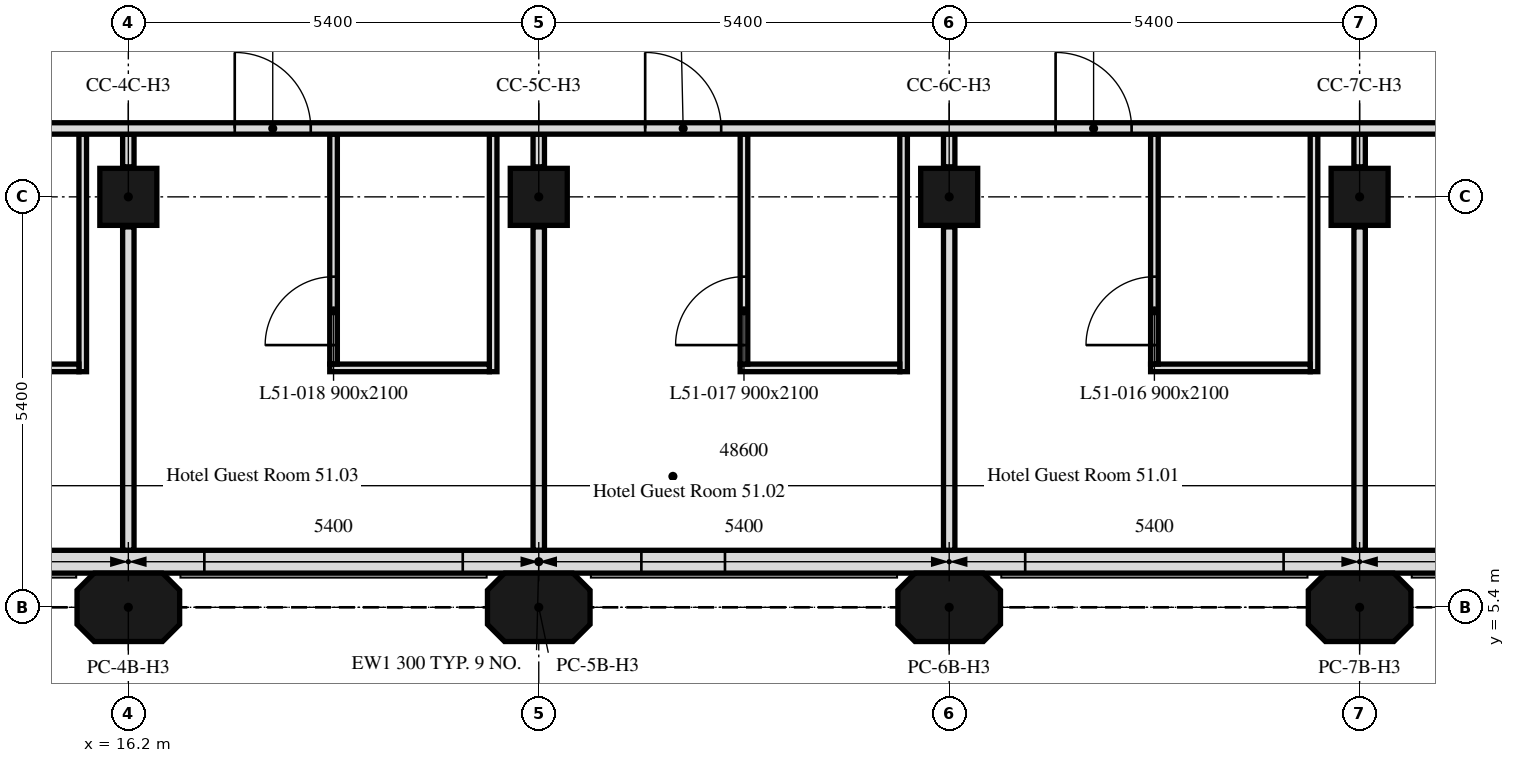
"""IFC4 building model, lengths in metres.
Left out: names, types, materials, properties, quantities, classifications, styles, units other than length and angle.
Written with IfcOpenShell. Run it as: python <this file> out.ifc"""

import sys

from ifc_helpers import new_model, si_unit, direction, frame, frame_2d, origin, origin_2d, place, context, subcontext, project, spatial, polyline, rectangle, outline, extrude, element, fill, save


model = new_model("IFC4")
c1 = context("Model", 3, precision=1e-05, world=origin(), true_north=direction((0.0, 1.0)))
c2 = subcontext(c1, "Body", "Model", "MODEL_VIEW")
j1 = project(units=[si_unit("LENGTHUNIT", "METRE"), si_unit("PLANEANGLEUNIT", "RADIAN")], contexts=[c1])
p1 = place(None, origin())
s1 = spatial("IfcSite", under=j1, at=p1, CompositionType="ELEMENT")
p2 = place(p1, origin())
s2 = spatial("IfcBuilding", under=s1, at=p2, CompositionType="ELEMENT")
p3 = place(p2, frame((0.0, 0.0, 207.1)))
s3 = spatial("IfcBuildingStorey", under=s2, at=p3, CompositionType="ELEMENT", Elevation=207.1)
for number, where, z_axis, x_axis in (
    (1, (16.2, 5.4, 0.0), (0.0, 0.0, 1.0), (1.0, 0.0, 0.0)),
    (2, (21.6, 5.4, 0.0), (0.0, 0.0, 1.0), (1.0, 0.0, 0.0)),
    (3, (27.0, 5.4, 0.0), (0.0, 0.0, 1.0), (1.0, 0.0, 0.0)),
    (4, (32.4, 5.4, 0.0), (0.0, 0.0, 1.0), (1.0, 0.0, 0.0)),
):
    element("IfcColumn", number, at=place(p3, frame(where, z_axis=z_axis, x_axis=x_axis)), inside=s3, PredefinedType="COLUMN", context=c2, shape_type="SweptSolid", body=[
        extrude(outline(polyline([(-0.45, -0.45), (0.45, -0.45), (0.675, -0.225), (0.675, 0.225), (0.45, 0.45), (-0.45, 0.45), (-0.675, 0.225), (-0.675, -0.225), (-0.45, -0.45)])), origin(), (0.0, 0.0, 1.0), 3.0),
    ])
for number, where, z_axis, x_axis in (
    (5, (16.2, 10.8, 0.0), (0.0, 0.0, 1.0), (1.0, 0.0, 0.0)),
    (6, (21.6, 10.8, 0.0), (0.0, 0.0, 1.0), (1.0, 0.0, 0.0)),
    (7, (27.0, 10.8, 0.0), (0.0, 0.0, 1.0), (1.0, 0.0, 0.0)),
    (8, (32.4, 10.8, 0.0), (0.0, 0.0, 1.0), (1.0, 0.0, 0.0)),
):
    element("IfcColumn", number, at=place(p3, frame(where, z_axis=z_axis, x_axis=x_axis)), inside=s3, PredefinedType="COLUMN", context=c2, shape_type="SweptSolid", body=[
        extrude(rectangle(XDim=0.75, YDim=0.75, at=origin_2d()), origin(), (0.0, 0.0, 1.0), 3.0),
    ])
p4 = place(p3, frame((5.586, 6.0, 0.0), z_axis=(0.0, 0.0, 1.0), x_axis=(1.0, 0.0, 0.0)))
e9 = element("IfcWall", 9, at=p4, inside=s3, PredefinedType="SOLIDWALL", context=c2, shape_type="SweptSolid", body=[
    extrude(rectangle(XDim=32.027, YDim=0.3, at=frame_2d((16.014, 0.0))), origin(), (0.0, 0.0, 1.0), 3.0),
])
p5 = place(p4, frame((0.814, 0.0, 0.9)))
e10 = element("IfcOpeningElement", 10, at=p5, cuts=e9, PredefinedType="OPENING", context=c2, shape_type="SweptSolid", body=[
    extrude(rectangle(XDim=3.4, YDim=1.7, at=frame_2d((1.7, 0.85))), frame((0.0, 0.16, 0.0), z_axis=(0.0, -1.0, 0.0), x_axis=(1.0, 0.0, 0.0)), (0.0, 0.0, 1.0), 0.32),
])
p6 = place(p4, frame((6.564, 0.0, 0.9)))
e11 = element("IfcOpeningElement", 11, at=p6, cuts=e9, PredefinedType="OPENING", context=c2, shape_type="SweptSolid", body=[
    extrude(rectangle(XDim=1.1, YDim=1.7, at=frame_2d((0.55, 0.85))), frame((0.0, 0.16, 0.0), z_axis=(0.0, -1.0, 0.0), x_axis=(1.0, 0.0, 0.0)), (0.0, 0.0, 1.0), 0.32),
])
p7 = place(p4, frame((11.614, 0.0, 0.9)))
e12 = element("IfcOpeningElement", 12, at=p7, cuts=e9, PredefinedType="OPENING", context=c2, shape_type="SweptSolid", body=[
    extrude(rectangle(XDim=3.4, YDim=1.7, at=frame_2d((1.7, 0.85))), frame((0.0, 0.16, 0.0), z_axis=(0.0, -1.0, 0.0), x_axis=(1.0, 0.0, 0.0)), (0.0, 0.0, 1.0), 0.32),
])
p8 = place(p4, frame((17.364, 0.0, 0.9)))
e13 = element("IfcOpeningElement", 13, at=p8, cuts=e9, PredefinedType="OPENING", context=c2, shape_type="SweptSolid", body=[
    extrude(rectangle(XDim=1.1, YDim=1.7, at=frame_2d((0.55, 0.85))), frame((0.0, 0.16, 0.0), z_axis=(0.0, -1.0, 0.0), x_axis=(1.0, 0.0, 0.0)), (0.0, 0.0, 1.0), 0.32),
])
p9 = place(p4, frame((22.414, 0.0, 0.9)))
e14 = element("IfcOpeningElement", 14, at=p9, cuts=e9, PredefinedType="OPENING", context=c2, shape_type="SweptSolid", body=[
    extrude(rectangle(XDim=3.4, YDim=1.7, at=frame_2d((1.7, 0.85))), frame((0.0, 0.16, 0.0), z_axis=(0.0, -1.0, 0.0), x_axis=(1.0, 0.0, 0.0)), (0.0, 0.0, 1.0), 0.32),
])
p10 = place(p4, frame((28.164, 0.0, 0.9)))
e15 = element("IfcOpeningElement", 15, at=p10, cuts=e9, PredefinedType="OPENING", context=c2, shape_type="SweptSolid", body=[
    extrude(rectangle(XDim=1.1, YDim=1.7, at=frame_2d((0.55, 0.85))), frame((0.0, 0.16, 0.0), z_axis=(0.0, -1.0, 0.0), x_axis=(1.0, 0.0, 0.0)), (0.0, 0.0, 1.0), 0.32),
])
p11 = place(p3, frame((32.4, 11.625, 0.0), z_axis=(0.0, 0.0, 1.0), x_axis=(0.0, -1.0, 0.0)))
e16 = element("IfcWall", 16, at=p11, inside=s3, PredefinedType="PARTITIONING", context=c2, shape_type="SweptSolid", body=[
    extrude(rectangle(XDim=0.43, YDim=0.15, at=frame_2d((0.215, 0.0))), origin(), (0.0, 0.0, 1.0), 3.0),
])
p12 = place(p3, frame((32.4, 10.405, 0.0), z_axis=(0.0, 0.0, 1.0), x_axis=(0.0, -1.0, 0.0)))
e17 = element("IfcWall", 17, at=p12, inside=s3, PredefinedType="PARTITIONING", context=c2, shape_type="SweptSolid", body=[
    extrude(rectangle(XDim=4.254, YDim=0.15, at=frame_2d((2.127, 0.0))), origin(), (0.0, 0.0, 1.0), 3.0),
])
p13 = place(p3, frame((31.8, 11.625, 0.0), z_axis=(0.0, 0.0, 1.0), x_axis=(0.0, -1.0, 0.0)))
e18 = element("IfcWall", 18, at=p13, inside=s3, PredefinedType="PARTITIONING", context=c2, shape_type="SweptSolid", body=[
    extrude(rectangle(XDim=3.125, YDim=0.1, at=frame_2d((1.562, 0.0))), origin(), (0.0, 0.0, 1.0), 3.0),
])
p14 = place(p3, frame((31.75, 8.55, 0.0), z_axis=(0.0, 0.0, 1.0), x_axis=(-1.0, 0.0, 0.0)))
e19 = element("IfcWall", 19, at=p14, inside=s3, PredefinedType="PARTITIONING", context=c2, shape_type="SweptSolid", body=[
    extrude(rectangle(XDim=2.1, YDim=0.1, at=frame_2d((1.05, 0.0))), origin(), (0.0, 0.0, 1.0), 3.0),
])
p15 = place(p3, frame((29.7, 8.6, 0.0), z_axis=(0.0, 0.0, 1.0), x_axis=(0.0, 1.0, 0.0)))
e20 = element("IfcWall", 20, at=p15, inside=s3, PredefinedType="PARTITIONING", context=c2, shape_type="SweptSolid", body=[
    extrude(rectangle(XDim=3.025, YDim=0.1, at=frame_2d((1.512, 0.0))), origin(), (0.0, 0.0, 1.0), 3.0),
])
p16 = place(p15, frame((0.25, 0.0, 0.0)))
e21 = element("IfcOpeningElement", 21, at=p16, cuts=e20, PredefinedType="OPENING", context=c2, shape_type="SweptSolid", body=[
    extrude(rectangle(XDim=0.9, YDim=2.1, at=frame_2d((0.45, 1.05))), frame((0.0, 0.05, 0.0), z_axis=(0.0, -1.0, 0.0), x_axis=(1.0, 0.0, 0.0)), (0.0, 0.0, 1.0), 0.1),
])
p17 = place(p3, frame((27.0, 11.625, 0.0), z_axis=(0.0, 0.0, 1.0), x_axis=(0.0, -1.0, 0.0)))
e22 = element("IfcWall", 22, at=p17, inside=s3, PredefinedType="PARTITIONING", context=c2, shape_type="SweptSolid", body=[
    extrude(rectangle(XDim=0.43, YDim=0.15, at=frame_2d((0.215, 0.0))), origin(), (0.0, 0.0, 1.0), 3.0),
])
p18 = place(p3, frame((27.0, 10.405, 0.0), z_axis=(0.0, 0.0, 1.0), x_axis=(0.0, -1.0, 0.0)))
e23 = element("IfcWall", 23, at=p18, inside=s3, PredefinedType="PARTITIONING", context=c2, shape_type="SweptSolid", body=[
    extrude(rectangle(XDim=4.254, YDim=0.15, at=frame_2d((2.127, 0.0))), origin(), (0.0, 0.0, 1.0), 3.0),
])
p19 = place(p3, frame((26.4, 11.625, 0.0), z_axis=(0.0, 0.0, 1.0), x_axis=(0.0, -1.0, 0.0)))
e24 = element("IfcWall", 24, at=p19, inside=s3, PredefinedType="PARTITIONING", context=c2, shape_type="SweptSolid", body=[
    extrude(rectangle(XDim=3.125, YDim=0.1, at=frame_2d((1.562, 0.0))), origin(), (0.0, 0.0, 1.0), 3.0),
])
p20 = place(p3, frame((26.35, 8.55, 0.0), z_axis=(0.0, 0.0, 1.0), x_axis=(-1.0, 0.0, 0.0)))
e25 = element("IfcWall", 25, at=p20, inside=s3, PredefinedType="PARTITIONING", context=c2, shape_type="SweptSolid", body=[
    extrude(rectangle(XDim=2.1, YDim=0.1, at=frame_2d((1.05, 0.0))), origin(), (0.0, 0.0, 1.0), 3.0),
])
p21 = place(p3, frame((24.3, 8.6, 0.0), z_axis=(0.0, 0.0, 1.0), x_axis=(0.0, 1.0, 0.0)))
e26 = element("IfcWall", 26, at=p21, inside=s3, PredefinedType="PARTITIONING", context=c2, shape_type="SweptSolid", body=[
    extrude(rectangle(XDim=3.025, YDim=0.1, at=frame_2d((1.512, 0.0))), origin(), (0.0, 0.0, 1.0), 3.0),
])
p22 = place(p21, frame((0.25, 0.0, 0.0)))
e27 = element("IfcOpeningElement", 27, at=p22, cuts=e26, PredefinedType="OPENING", context=c2, shape_type="SweptSolid", body=[
    extrude(rectangle(XDim=0.9, YDim=2.1, at=frame_2d((0.45, 1.05))), frame((0.0, 0.05, 0.0), z_axis=(0.0, -1.0, 0.0), x_axis=(1.0, 0.0, 0.0)), (0.0, 0.0, 1.0), 0.1),
])
p23 = place(p3, frame((21.6, 11.625, 0.0), z_axis=(0.0, 0.0, 1.0), x_axis=(0.0, -1.0, 0.0)))
e28 = element("IfcWall", 28, at=p23, inside=s3, PredefinedType="PARTITIONING", context=c2, shape_type="SweptSolid", body=[
    extrude(rectangle(XDim=0.43, YDim=0.15, at=frame_2d((0.215, 0.0))), origin(), (0.0, 0.0, 1.0), 3.0),
])
p24 = place(p3, frame((21.6, 10.405, 0.0), z_axis=(0.0, 0.0, 1.0), x_axis=(0.0, -1.0, 0.0)))
e29 = element("IfcWall", 29, at=p24, inside=s3, PredefinedType="PARTITIONING", context=c2, shape_type="SweptSolid", body=[
    extrude(rectangle(XDim=4.254, YDim=0.15, at=frame_2d((2.127, 0.0))), origin(), (0.0, 0.0, 1.0), 3.0),
])
p25 = place(p3, frame((21.0, 11.625, 0.0), z_axis=(0.0, 0.0, 1.0), x_axis=(0.0, -1.0, 0.0)))
e30 = element("IfcWall", 30, at=p25, inside=s3, PredefinedType="PARTITIONING", context=c2, shape_type="SweptSolid", body=[
    extrude(rectangle(XDim=3.125, YDim=0.1, at=frame_2d((1.562, 0.0))), origin(), (0.0, 0.0, 1.0), 3.0),
])
p26 = place(p3, frame((20.95, 8.55, 0.0), z_axis=(0.0, 0.0, 1.0), x_axis=(-1.0, 0.0, 0.0)))
e31 = element("IfcWall", 31, at=p26, inside=s3, PredefinedType="PARTITIONING", context=c2, shape_type="SweptSolid", body=[
    extrude(rectangle(XDim=2.1, YDim=0.1, at=frame_2d((1.05, 0.0))), origin(), (0.0, 0.0, 1.0), 3.0),
])
p27 = place(p3, frame((18.9, 8.6, 0.0), z_axis=(0.0, 0.0, 1.0), x_axis=(0.0, 1.0, 0.0)))
e32 = element("IfcWall", 32, at=p27, inside=s3, PredefinedType="PARTITIONING", context=c2, shape_type="SweptSolid", body=[
    extrude(rectangle(XDim=3.025, YDim=0.1, at=frame_2d((1.512, 0.0))), origin(), (0.0, 0.0, 1.0), 3.0),
])
p28 = place(p27, frame((0.25, 0.0, 0.0)))
e33 = element("IfcOpeningElement", 33, at=p28, cuts=e32, PredefinedType="OPENING", context=c2, shape_type="SweptSolid", body=[
    extrude(rectangle(XDim=0.9, YDim=2.1, at=frame_2d((0.45, 1.05))), frame((0.0, 0.05, 0.0), z_axis=(0.0, -1.0, 0.0), x_axis=(1.0, 0.0, 0.0)), (0.0, 0.0, 1.0), 0.1),
])
p29 = place(p3, frame((16.2, 11.625, 0.0), z_axis=(0.0, 0.0, 1.0), x_axis=(0.0, -1.0, 0.0)))
e34 = element("IfcWall", 34, at=p29, inside=s3, PredefinedType="PARTITIONING", context=c2, shape_type="SweptSolid", body=[
    extrude(rectangle(XDim=0.43, YDim=0.15, at=frame_2d((0.215, 0.0))), origin(), (0.0, 0.0, 1.0), 3.0),
])
p30 = place(p3, frame((16.2, 10.405, 0.0), z_axis=(0.0, 0.0, 1.0), x_axis=(0.0, -1.0, 0.0)))
e35 = element("IfcWall", 35, at=p30, inside=s3, PredefinedType="PARTITIONING", context=c2, shape_type="SweptSolid", body=[
    extrude(rectangle(XDim=4.254, YDim=0.15, at=frame_2d((2.127, 0.0))), origin(), (0.0, 0.0, 1.0), 3.0),
])
p31 = place(p3, frame((15.6, 11.625, 0.0), z_axis=(0.0, 0.0, 1.0), x_axis=(0.0, -1.0, 0.0)))
e36 = element("IfcWall", 36, at=p31, inside=s3, PredefinedType="PARTITIONING", context=c2, shape_type="SweptSolid", body=[
    extrude(rectangle(XDim=3.125, YDim=0.1, at=frame_2d((1.562, 0.0))), origin(), (0.0, 0.0, 1.0), 3.0),
])
p32 = place(p3, frame((15.55, 8.55, 0.0), z_axis=(0.0, 0.0, 1.0), x_axis=(-1.0, 0.0, 0.0)))
e37 = element("IfcWall", 37, at=p32, inside=s3, PredefinedType="PARTITIONING", context=c2, shape_type="SweptSolid", body=[
    extrude(rectangle(XDim=2.1, YDim=0.1, at=frame_2d((1.05, 0.0))), origin(), (0.0, 0.0, 1.0), 3.0),
])
p33 = place(p3, frame((0.751, 11.7, 0.0), z_axis=(0.0, 0.0, 1.0), x_axis=(1.0, 0.0, 0.0)))
e38 = element("IfcWall", 38, at=p33, inside=s3, PredefinedType="PARTITIONING", context=c2, shape_type="SweptSolid", body=[
    extrude(rectangle(XDim=41.698, YDim=0.15, at=frame_2d((20.849, 0.0))), origin(), (0.0, 0.0, 1.0), 3.0),
])
p34 = place(p33, frame((27.649, 0.0, 0.0)))
e39 = element("IfcOpeningElement", 39, at=p34, cuts=e38, PredefinedType="OPENING", context=c2, shape_type="SweptSolid", body=[
    extrude(rectangle(XDim=1.0, YDim=2.1, at=frame_2d((0.5, 1.05))), frame((0.0, 0.075, 0.0), z_axis=(0.0, -1.0, 0.0), x_axis=(1.0, 0.0, 0.0)), (0.0, 0.0, 1.0), 0.15),
])
p35 = place(p33, frame((22.249, 0.0, 0.0)))
e40 = element("IfcOpeningElement", 40, at=p35, cuts=e38, PredefinedType="OPENING", context=c2, shape_type="SweptSolid", body=[
    extrude(rectangle(XDim=1.0, YDim=2.1, at=frame_2d((0.5, 1.05))), frame((0.0, 0.075, 0.0), z_axis=(0.0, -1.0, 0.0), x_axis=(1.0, 0.0, 0.0)), (0.0, 0.0, 1.0), 0.15),
])
p36 = place(p33, frame((16.849, 0.0, 0.0)))
e41 = element("IfcOpeningElement", 41, at=p36, cuts=e38, PredefinedType="OPENING", context=c2, shape_type="SweptSolid", body=[
    extrude(rectangle(XDim=1.0, YDim=2.1, at=frame_2d((0.5, 1.05))), frame((0.0, 0.075, 0.0), z_axis=(0.0, -1.0, 0.0), x_axis=(1.0, 0.0, 0.0)), (0.0, 0.0, 1.0), 0.15),
])
p37 = place(p33, frame((11.449, 0.0, 0.0)))
e42 = element("IfcOpeningElement", 42, at=p37, cuts=e38, PredefinedType="OPENING", context=c2, shape_type="SweptSolid", body=[
    extrude(rectangle(XDim=1.0, YDim=2.1, at=frame_2d((0.5, 1.05))), frame((0.0, 0.075, 0.0), z_axis=(0.0, -1.0, 0.0), x_axis=(1.0, 0.0, 0.0)), (0.0, 0.0, 1.0), 0.15),
])
p38 = place(p33, frame((2.744, 0.0, 0.0)))
e43 = element("IfcOpeningElement", 43, at=p38, cuts=e38, PredefinedType="OPENING", context=c2, shape_type="SweptSolid", body=[
    extrude(rectangle(XDim=1.0, YDim=2.1, at=frame_2d((0.5, 1.05))), frame((0.0, 0.075, 0.0), z_axis=(0.0, -1.0, 0.0), x_axis=(1.0, 0.0, 0.0)), (0.0, 0.0, 1.0), 0.15),
])
p39 = place(p33, frame((39.249, 0.0, 0.0)))
e44 = element("IfcOpeningElement", 44, at=p39, cuts=e38, PredefinedType="OPENING", context=c2, shape_type="SweptSolid", body=[
    extrude(rectangle(XDim=1.0, YDim=2.1, at=frame_2d((0.5, 1.05))), frame((0.0, 0.075, 0.0), z_axis=(0.0, -1.0, 0.0), x_axis=(1.0, 0.0, 0.0)), (0.0, 0.0, 1.0), 0.15),
])
p40 = place(p7, origin())
e45 = element("IfcWindow", 45, at=p40, inside=s3, PartitioningType="SINGLE_PANEL", PredefinedType="WINDOW", context=c2, shape_type="SweptSolid", body=[
    extrude(rectangle(XDim=3.4, YDim=1.7, at=frame_2d((1.7, 0.85))), frame((0.0, 0.03, 0.0), z_axis=(0.0, -1.0, 0.0), x_axis=(1.0, 0.0, 0.0)), (0.0, 0.0, 1.0), 0.06),
])
fill(e12, e45)
p41 = place(p8, origin())
e46 = element("IfcWindow", 46, at=p41, inside=s3, PartitioningType="SINGLE_PANEL", PredefinedType="WINDOW", context=c2, shape_type="SweptSolid", body=[
    extrude(rectangle(XDim=1.1, YDim=1.7, at=frame_2d((0.55, 0.85))), frame((0.0, 0.03, 0.0), z_axis=(0.0, -1.0, 0.0), x_axis=(1.0, 0.0, 0.0)), (0.0, 0.0, 1.0), 0.06),
])
fill(e13, e46)
p42 = place(p9, origin())
e47 = element("IfcWindow", 47, at=p42, inside=s3, PartitioningType="SINGLE_PANEL", PredefinedType="WINDOW", context=c2, shape_type="SweptSolid", body=[
    extrude(rectangle(XDim=3.4, YDim=1.7, at=frame_2d((1.7, 0.85))), frame((0.0, 0.03, 0.0), z_axis=(0.0, -1.0, 0.0), x_axis=(1.0, 0.0, 0.0)), (0.0, 0.0, 1.0), 0.06),
])
fill(e14, e47)
p43 = place(p16, origin())
e48 = element("IfcDoor", 48, at=p43, inside=s3, OperationType="SINGLE_SWING_RIGHT", PredefinedType="DOOR", context=c2, shape_type="SweptSolid", body=[
    extrude(rectangle(XDim=0.9, YDim=2.1, at=frame_2d((0.45, 1.05))), frame((0.0, 0.025, 0.0), z_axis=(0.0, -1.0, 0.0), x_axis=(1.0, 0.0, 0.0)), (0.0, 0.0, 1.0), 0.05),
])
fill(e21, e48)
p44 = place(p22, origin())
e49 = element("IfcDoor", 49, at=p44, inside=s3, OperationType="SINGLE_SWING_LEFT", PredefinedType="DOOR", context=c2, shape_type="SweptSolid", body=[
    extrude(rectangle(XDim=0.9, YDim=2.1, at=frame_2d((0.45, 1.05))), frame((0.0, 0.025, 0.0), z_axis=(0.0, -1.0, 0.0), x_axis=(1.0, 0.0, 0.0)), (0.0, 0.0, 1.0), 0.05),
])
fill(e27, e49)
p45 = place(p28, origin())
e50 = element("IfcDoor", 50, at=p45, inside=s3, OperationType="SINGLE_SWING_LEFT", PredefinedType="DOOR", context=c2, shape_type="SweptSolid", body=[
    extrude(rectangle(XDim=0.9, YDim=2.1, at=frame_2d((0.45, 1.05))), frame((0.0, 0.025, 0.0), z_axis=(0.0, -1.0, 0.0), x_axis=(1.0, 0.0, 0.0)), (0.0, 0.0, 1.0), 0.05),
])
fill(e33, e50)
p46 = place(p34, origin())
e51 = element("IfcDoor", 51, at=p46, inside=s3, OperationType="SINGLE_SWING_LEFT", PredefinedType="DOOR", context=c2, shape_type="SweptSolid", body=[
    extrude(rectangle(XDim=1.0, YDim=2.1, at=frame_2d((0.5, 1.05))), frame((0.0, 0.025, 0.0), z_axis=(0.0, -1.0, 0.0), x_axis=(1.0, 0.0, 0.0)), (0.0, 0.0, 1.0), 0.05),
])
fill(e39, e51)
p47 = place(p35, origin())
e52 = element("IfcDoor", 52, at=p47, inside=s3, OperationType="SINGLE_SWING_LEFT", PredefinedType="DOOR", context=c2, shape_type="SweptSolid", body=[
    extrude(rectangle(XDim=1.0, YDim=2.1, at=frame_2d((0.5, 1.05))), frame((0.0, 0.025, 0.0), z_axis=(0.0, -1.0, 0.0), x_axis=(1.0, 0.0, 0.0)), (0.0, 0.0, 1.0), 0.05),
])
fill(e40, e52)
p48 = place(p36, origin())
e53 = element("IfcDoor", 53, at=p48, inside=s3, OperationType="SINGLE_SWING_RIGHT", PredefinedType="DOOR", context=c2, shape_type="SweptSolid", body=[
    extrude(rectangle(XDim=1.0, YDim=2.1, at=frame_2d((0.5, 1.05))), frame((0.0, 0.025, 0.0), z_axis=(0.0, -1.0, 0.0), x_axis=(1.0, 0.0, 0.0)), (0.0, 0.0, 1.0), 0.05),
])
fill(e41, e53)
save(model, sys.argv[1])
